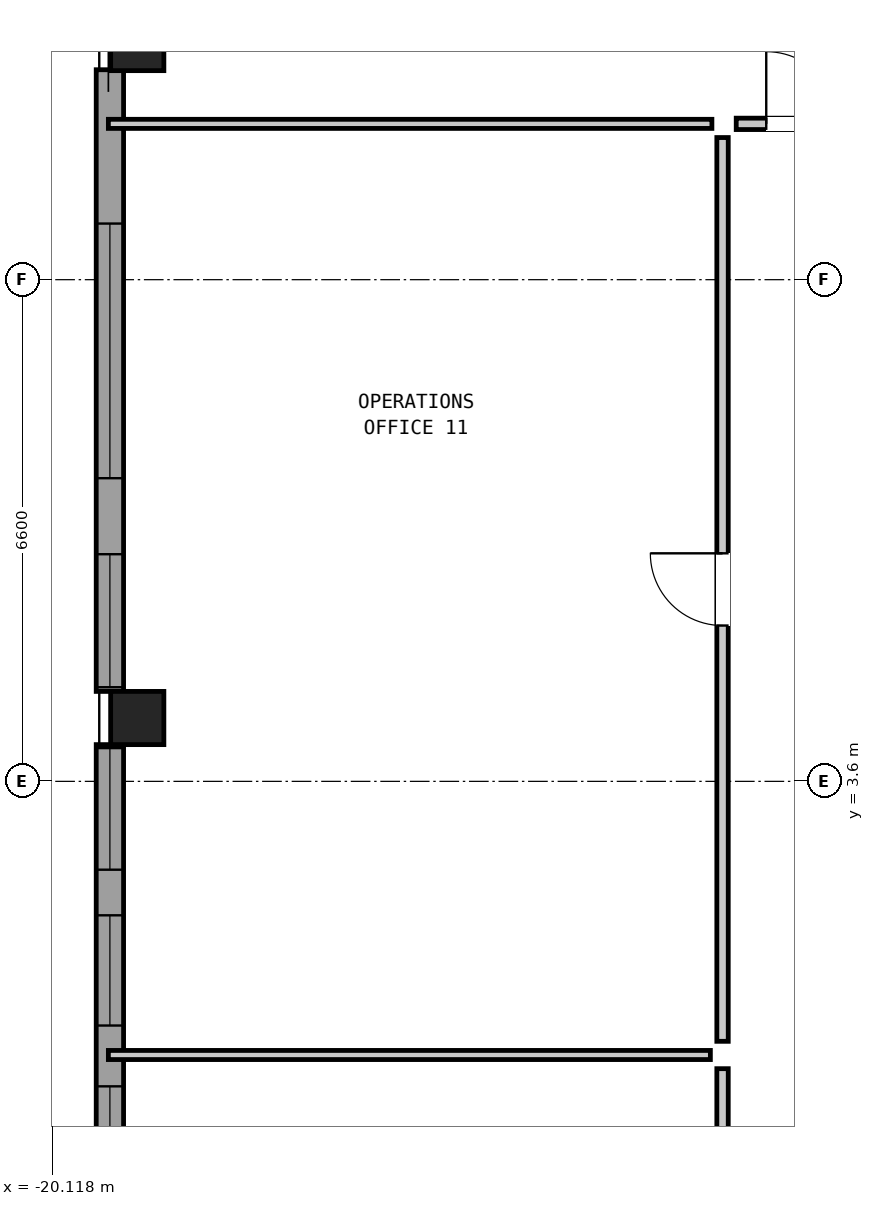
"""IFC4 building model, lengths in metres.
Left out: names, types, materials, properties, quantities, classifications, styles, units other than length and angle.
Written with IfcOpenShell. Run it as: python <this file> out.ifc"""

import sys

from ifc_helpers import new_model, si_unit, direction, frame, frame_2d, origin, origin_2d, place, context, subcontext, project, spatial, rectangle, hollow_rectangle, extrude, element, fill, save


model = new_model("IFC4")
c1 = context("Model", 3, precision=1e-05, world=origin(), true_north=direction((0.0, 1.0)))
c2 = subcontext(c1, "Body", "Model", "MODEL_VIEW")
j1 = project(units=[si_unit("LENGTHUNIT", "METRE"), si_unit("PLANEANGLEUNIT", "RADIAN")], contexts=[c1])
p1 = place(None, origin())
s1 = spatial("IfcSite", under=j1, at=p1, CompositionType="ELEMENT")
p2 = place(p1, origin())
s2 = spatial("IfcBuilding", under=s1, at=p2, CompositionType="ELEMENT")
p3 = place(p2, frame((0.0, 0.0, 208.65)))
s3 = spatial("IfcBuildingStorey", under=s2, at=p3, CompositionType="ELEMENT", Elevation=208.65)
for number, where, z_axis, x_axis in (
    (1, (-19.0, 13.3, 0.0), (0.0, 0.0, 1.0), (0.0, 1.0, 0.0)),
    (2, (-19.0, 4.433, 0.0), (0.0, 0.0, 1.0), (0.0, 1.0, 0.0)),
):
    element("IfcColumn", number, at=place(p3, frame(where, z_axis=z_axis, x_axis=x_axis)), inside=s3, PredefinedType="COLUMN", context=c2, shape_type="SweptSolid", body=[
        extrude(hollow_rectangle(XDim=0.7, YDim=0.7, WallThickness=0.045, at=origin_2d()), origin(), (0.0, 0.0, 1.0), 3.05),
    ])
p4 = place(p3, frame((-19.36, -4.083, 0.0), z_axis=(0.0, 0.0, 1.0), x_axis=(0.0, 1.0, 0.0)))
e3 = element("IfcWall", 3, at=p4, inside=s3, PredefinedType="SOLIDWALL", context=c2, shape_type="SweptSolid", body=[
    extrude(rectangle(XDim=8.167, YDim=0.36, at=frame_2d((4.083, 0.0))), origin(), (0.0, 0.0, 1.0), 2.374),
])
p5 = place(p4, frame((0.071, 0.0, 1.3)))
e4 = element("IfcOpeningElement", 4, at=p5, cuts=e3, PredefinedType="OPENING", context=c2, shape_type="SweptSolid", body=[
    extrude(rectangle(XDim=1.65, YDim=0.9, at=frame_2d((0.825, 0.45))), frame((0.0, 0.192, 0.0), z_axis=(0.0, -1.0, 0.0), x_axis=(1.0, 0.0, 0.0)), (0.0, 0.0, 1.0), 0.384),
])
p6 = place(p4, frame((2.321, 0.0, 0.2)))
e5 = element("IfcOpeningElement", 5, at=p6, cuts=e3, PredefinedType="OPENING", context=c2, shape_type="SweptSolid", body=[
    extrude(rectangle(XDim=1.35, YDim=0.95, at=frame_2d((0.675, 0.475))), frame((0.0, 0.192, 0.0), z_axis=(0.0, -1.0, 0.0), x_axis=(1.0, 0.0, 0.0)), (0.0, 0.0, 1.0), 0.384),
])
p7 = place(p4, frame((4.471, 0.0, 0.2)))
e6 = element("IfcOpeningElement", 6, at=p7, cuts=e3, PredefinedType="OPENING", context=c2, shape_type="SweptSolid", body=[
    extrude(rectangle(XDim=1.45, YDim=0.9, at=frame_2d((0.725, 0.45))), frame((0.0, 0.192, 0.0), z_axis=(0.0, -1.0, 0.0), x_axis=(1.0, 0.0, 0.0)), (0.0, 0.0, 1.0), 0.384),
])
p8 = place(p4, frame((6.521, 0.0, 1.25)))
e7 = element("IfcOpeningElement", 7, at=p8, cuts=e3, PredefinedType="OPENING", context=c2, shape_type="SweptSolid", body=[
    extrude(rectangle(XDim=1.6, YDim=0.95, at=frame_2d((0.8, 0.475))), frame((0.0, 0.192, 0.0), z_axis=(0.0, -1.0, 0.0), x_axis=(1.0, 0.0, 0.0)), (0.0, 0.0, 1.0), 0.384),
])
p9 = place(p3, frame((-19.36, 4.783, 0.0), z_axis=(0.0, 0.0, 1.0), x_axis=(0.0, 1.0, 0.0)))
e8 = element("IfcWall", 8, at=p9, inside=s3, PredefinedType="SOLIDWALL", context=c2, shape_type="SweptSolid", body=[
    extrude(rectangle(XDim=8.179, YDim=0.36, at=frame_2d((4.089, 0.0))), origin(), (0.0, 0.0, 1.0), 2.374),
])
p10 = place(p9, frame((0.055, 0.0, 1.1)))
e9 = element("IfcOpeningElement", 9, at=p10, cuts=e8, PredefinedType="OPENING", context=c2, shape_type="SweptSolid", body=[
    extrude(rectangle(XDim=1.75, YDim=1.1, at=frame_2d((0.875, 0.55))), frame((0.0, 0.192, 0.0), z_axis=(0.0, -1.0, 0.0), x_axis=(1.0, 0.0, 0.0)), (0.0, 0.0, 1.0), 0.384),
])
p11 = place(p9, frame((2.805, 0.0, 0.2)))
e10 = element("IfcOpeningElement", 10, at=p11, cuts=e8, PredefinedType="OPENING", context=c2, shape_type="SweptSolid", body=[
    extrude(rectangle(XDim=3.35, YDim=1.0, at=frame_2d((1.675, 0.5))), frame((0.0, 0.192, 0.0), z_axis=(0.0, -1.0, 0.0), x_axis=(1.0, 0.0, 0.0)), (0.0, 0.0, 1.0), 0.384),
])
p12 = place(p3, frame((-19.38, 12.25, 0.0), z_axis=(0.0, 0.0, 1.0), x_axis=(1.0, 0.0, 0.0)))
e11 = element("IfcWall", 11, at=p12, inside=s3, PredefinedType="PARTITIONING", context=c2, shape_type="SweptSolid", body=[
    extrude(rectangle(XDim=7.94, YDim=0.12, at=frame_2d((3.97, 0.0))), origin(), (0.0, 0.0, 1.0), 2.86),
])
p13 = place(p3, frame((-19.38, 0.0, 0.0), z_axis=(0.0, 0.0, 1.0), x_axis=(1.0, 0.0, 0.0)))
e12 = element("IfcWall", 12, at=p13, inside=s3, PredefinedType="PARTITIONING", context=c2, shape_type="SweptSolid", body=[
    extrude(rectangle(XDim=7.92, YDim=0.12, at=frame_2d((3.96, 0.0))), origin(), (0.0, 0.0, 1.0), 2.86),
])
p14 = place(p3, frame((-11.12, 12.25, 0.0), z_axis=(0.0, 0.0, 1.0), x_axis=(1.0, 0.0, 0.0)))
e13 = element("IfcWall", 13, at=p14, inside=s3, PredefinedType="PARTITIONING", context=c2, shape_type="SweptSolid", body=[
    extrude(rectangle(XDim=2.54, YDim=0.15, at=frame_2d((1.27, 0.0))), origin(), (0.0, 0.0, 1.0), 2.86),
])
p15 = place(p14, frame((0.395, 0.0, 0.0)))
e14 = element("IfcOpeningElement", 14, at=p15, cuts=e13, PredefinedType="OPENING", context=c2, shape_type="SweptSolid", body=[
    extrude(rectangle(XDim=0.95, YDim=2.1, at=frame_2d((0.475, 1.05))), frame((0.0, 0.087, 0.0), z_axis=(0.0, -1.0, 0.0), x_axis=(1.0, 0.0, 0.0)), (0.0, 0.0, 1.0), 0.174),
])
p16 = place(p3, frame((-11.3, -10.87, 0.0), z_axis=(0.0, 0.0, 1.0), x_axis=(0.0, 1.0, 0.0)))
e15 = element("IfcWall", 15, at=p16, inside=s3, PredefinedType="PARTITIONING", context=c2, shape_type="SweptSolid", body=[
    extrude(rectangle(XDim=10.69, YDim=0.15, at=frame_2d((5.345, 0.0))), origin(), (0.0, 0.0, 1.0), 2.86),
])
p17 = place(p16, frame((4.87, 0.0, 0.0)))
e16 = element("IfcOpeningElement", 16, at=p17, cuts=e15, PredefinedType="OPENING", context=c2, shape_type="SweptSolid", body=[
    extrude(rectangle(XDim=0.95, YDim=2.1, at=frame_2d((0.475, 1.05))), frame((0.0, 0.087, 0.0), z_axis=(0.0, -1.0, 0.0), x_axis=(1.0, 0.0, 0.0)), (0.0, 0.0, 1.0), 0.174),
])
p18 = place(p3, frame((-11.3, 0.18, 0.0), z_axis=(0.0, 0.0, 1.0), x_axis=(0.0, 1.0, 0.0)))
e17 = element("IfcWall", 17, at=p18, inside=s3, PredefinedType="PARTITIONING", context=c2, shape_type="SweptSolid", body=[
    extrude(rectangle(XDim=11.89, YDim=0.15, at=frame_2d((5.945, 0.0))), origin(), (0.0, 0.0, 1.0), 2.86),
])
p19 = place(p18, frame((5.47, 0.0, 0.0)))
e18 = element("IfcOpeningElement", 18, at=p19, cuts=e17, PredefinedType="OPENING", context=c2, shape_type="SweptSolid", body=[
    extrude(rectangle(XDim=0.95, YDim=2.1, at=frame_2d((0.475, 1.05))), frame((0.0, 0.087, 0.0), z_axis=(0.0, -1.0, 0.0), x_axis=(1.0, 0.0, 0.0)), (0.0, 0.0, 1.0), 0.174),
])
p20 = place(p6, origin())
e19 = element("IfcWindow", 19, at=p20, inside=s3, PartitioningType="SINGLE_PANEL", PredefinedType="WINDOW", context=c2, shape_type="SweptSolid", body=[
    extrude(rectangle(XDim=1.35, YDim=0.95, at=frame_2d((0.675, 0.475))), frame((0.0, 0.03, 0.0), z_axis=(0.0, -1.0, 0.0), x_axis=(1.0, 0.0, 0.0)), (0.0, 0.0, 1.0), 0.06),
])
fill(e5, e19)
p21 = place(p7, origin())
e20 = element("IfcWindow", 20, at=p21, inside=s3, PartitioningType="SINGLE_PANEL", PredefinedType="WINDOW", context=c2, shape_type="SweptSolid", body=[
    extrude(rectangle(XDim=1.45, YDim=0.9, at=frame_2d((0.725, 0.45))), frame((0.0, 0.03, 0.0), z_axis=(0.0, -1.0, 0.0), x_axis=(1.0, 0.0, 0.0)), (0.0, 0.0, 1.0), 0.06),
])
fill(e6, e20)
p22 = place(p8, origin())
e21 = element("IfcWindow", 21, at=p22, inside=s3, PartitioningType="SINGLE_PANEL", PredefinedType="WINDOW", context=c2, shape_type="SweptSolid", body=[
    extrude(rectangle(XDim=1.6, YDim=0.95, at=frame_2d((0.8, 0.475))), frame((0.0, 0.03, 0.0), z_axis=(0.0, -1.0, 0.0), x_axis=(1.0, 0.0, 0.0)), (0.0, 0.0, 1.0), 0.06),
])
fill(e7, e21)
p23 = place(p10, origin())
e22 = element("IfcWindow", 22, at=p23, inside=s3, PartitioningType="SINGLE_PANEL", PredefinedType="WINDOW", context=c2, shape_type="SweptSolid", body=[
    extrude(rectangle(XDim=1.75, YDim=1.1, at=frame_2d((0.875, 0.55))), frame((0.0, 0.03, 0.0), z_axis=(0.0, -1.0, 0.0), x_axis=(1.0, 0.0, 0.0)), (0.0, 0.0, 1.0), 0.06),
])
fill(e9, e22)
p24 = place(p11, origin())
e23 = element("IfcWindow", 23, at=p24, inside=s3, PartitioningType="SINGLE_PANEL", PredefinedType="WINDOW", context=c2, shape_type="SweptSolid", body=[
    extrude(rectangle(XDim=3.35, YDim=1.0, at=frame_2d((1.675, 0.5))), frame((0.0, 0.03, 0.0), z_axis=(0.0, -1.0, 0.0), x_axis=(1.0, 0.0, 0.0)), (0.0, 0.0, 1.0), 0.06),
])
fill(e10, e23)
p25 = place(p15, origin())
e24 = element("IfcDoor", 24, at=p25, inside=s3, OperationType="SINGLE_SWING_LEFT", PredefinedType="DOOR", context=c2, shape_type="SweptSolid", body=[
    extrude(rectangle(XDim=0.95, YDim=2.1, at=frame_2d((0.475, 1.05))), frame((0.0, 0.025, 0.0), z_axis=(0.0, -1.0, 0.0), x_axis=(1.0, 0.0, 0.0)), (0.0, 0.0, 1.0), 0.05),
])
fill(e14, e24)
p26 = place(p19, origin())
e25 = element("IfcDoor", 25, at=p26, inside=s3, OperationType="SINGLE_SWING_RIGHT", PredefinedType="DOOR", context=c2, shape_type="SweptSolid", body=[
    extrude(rectangle(XDim=0.95, YDim=2.1, at=frame_2d((0.475, 1.05))), frame((0.0, 0.025, 0.0), z_axis=(0.0, -1.0, 0.0), x_axis=(1.0, 0.0, 0.0)), (0.0, 0.0, 1.0), 0.05),
])
fill(e18, e25)
save(model, sys.argv[1])
